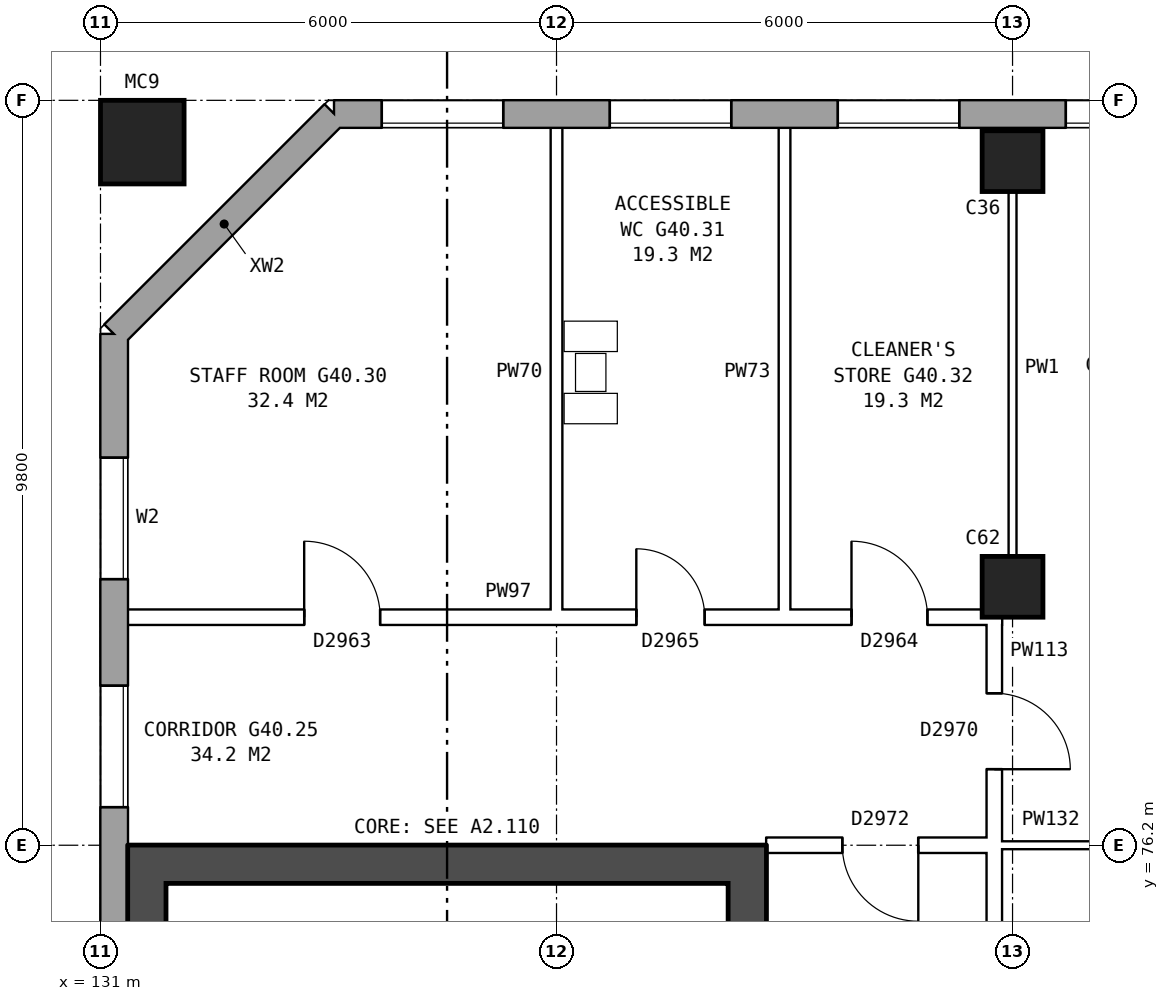
"""IFC4 building model, lengths in metres.
Left out: names, types, materials, properties, quantities, classifications, styles, units other than length and angle.
Written with IfcOpenShell. Run it as: python <this file> out.ifc"""

import sys

from ifc_helpers import new_model, si_unit, direction, frame, frame_2d, origin, origin_2d, place, context, subcontext, project, spatial, rectangle, hollow_rectangle, extrude, element, fill, save


model = new_model("IFC4")
c1 = context("Model", 3, precision=1e-05, world=origin(), true_north=direction((0.0, 1.0)))
c2 = subcontext(c1, "Body", "Model", "MODEL_VIEW")
j1 = project(units=[si_unit("LENGTHUNIT", "METRE"), si_unit("PLANEANGLEUNIT", "RADIAN")], contexts=[c1])
p1 = place(None, origin())
s1 = spatial("IfcSite", under=j1, at=p1, CompositionType="ELEMENT")
p2 = place(p1, origin())
s2 = spatial("IfcBuilding", under=s1, at=p2, CompositionType="ELEMENT")
p3 = place(p2, frame((0.0, 0.0, 142.3)))
s3 = spatial("IfcBuildingStorey", under=s2, at=p3, CompositionType="ELEMENT", Elevation=142.3)
for number, where, z_axis, x_axis in (
    (1, (143.0, 79.6, 0.0), (0.0, 0.0, 1.0), (1.0, 0.0, 0.0)),
    (2, (143.0, 85.2, 0.0), (0.0, 0.0, 1.0), (1.0, 0.0, 0.0)),
):
    element("IfcColumn", number, at=place(p3, frame(where, z_axis=z_axis, x_axis=x_axis)), inside=s3, PredefinedType="COLUMN", context=c2, shape_type="SweptSolid", body=[
        extrude(rectangle(XDim=0.8, YDim=0.8, at=origin_2d()), origin(), (0.0, 0.0, 1.0), 5.6),
    ])
p4 = place(p3, frame((131.55, 85.45, 0.0), z_axis=(0.0, 0.0, 1.0), x_axis=(1.0, 0.0, 0.0)))
e3 = element("IfcColumn", 3, at=p4, inside=s3, PredefinedType="COLUMN", context=c2, shape_type="SweptSolid", body=[
    extrude(hollow_rectangle(XDim=1.1, YDim=1.1, WallThickness=0.06, at=origin_2d()), origin(), (0.0, 0.0, 1.0), 6.2),
])
p5 = place(p3, frame((168.425, 85.82, 0.0), z_axis=(0.0, 0.0, 1.0), x_axis=(-1.0, 0.0, 0.0)))
e4 = element("IfcWall", 4, at=p5, inside=s3, PredefinedType="STANDARD", context=c2, shape_type="SweptSolid", body=[
    extrude(rectangle(XDim=34.351, YDim=0.36, at=frame_2d((17.175, 0.0))), origin(), (0.0, 0.0, 1.0), 5.6),
])
p6 = place(p5, frame((2.125, 0.0, 0.15)))
e5 = element("IfcOpeningElement", 5, at=p6, cuts=e4, PredefinedType="OPENING", context=c2, shape_type="SweptSolid", body=[
    extrude(rectangle(XDim=1.6, YDim=2.4, at=frame_2d((0.8, 1.2))), frame((0.0, 0.19, 0.0), z_axis=(0.0, -1.0, 0.0), x_axis=(1.0, 0.0, 0.0)), (0.0, 0.0, 1.0), 0.38),
])
p7 = place(p5, frame((5.125, 0.0, 0.15)))
e6 = element("IfcOpeningElement", 6, at=p7, cuts=e4, PredefinedType="OPENING", context=c2, shape_type="SweptSolid", body=[
    extrude(rectangle(XDim=1.6, YDim=2.4, at=frame_2d((0.8, 1.2))), frame((0.0, 0.19, 0.0), z_axis=(0.0, -1.0, 0.0), x_axis=(1.0, 0.0, 0.0)), (0.0, 0.0, 1.0), 0.38),
])
p8 = place(p5, frame((8.125, 0.0, 0.15)))
e7 = element("IfcOpeningElement", 7, at=p8, cuts=e4, PredefinedType="OPENING", context=c2, shape_type="SweptSolid", body=[
    extrude(rectangle(XDim=1.6, YDim=2.4, at=frame_2d((0.8, 1.2))), frame((0.0, 0.19, 0.0), z_axis=(0.0, -1.0, 0.0), x_axis=(1.0, 0.0, 0.0)), (0.0, 0.0, 1.0), 0.38),
])
p9 = place(p5, frame((11.125, 0.0, 0.15)))
e8 = element("IfcOpeningElement", 8, at=p9, cuts=e4, PredefinedType="OPENING", context=c2, shape_type="SweptSolid", body=[
    extrude(rectangle(XDim=1.6, YDim=2.4, at=frame_2d((0.8, 1.2))), frame((0.0, 0.19, 0.0), z_axis=(0.0, -1.0, 0.0), x_axis=(1.0, 0.0, 0.0)), (0.0, 0.0, 1.0), 0.38),
])
p10 = place(p5, frame((14.125, 0.0, 0.15)))
e9 = element("IfcOpeningElement", 9, at=p10, cuts=e4, PredefinedType="OPENING", context=c2, shape_type="SweptSolid", body=[
    extrude(rectangle(XDim=1.6, YDim=2.4, at=frame_2d((0.8, 1.2))), frame((0.0, 0.19, 0.0), z_axis=(0.0, -1.0, 0.0), x_axis=(1.0, 0.0, 0.0)), (0.0, 0.0, 1.0), 0.38),
])
p11 = place(p5, frame((17.125, 0.0, 0.15)))
e10 = element("IfcOpeningElement", 10, at=p11, cuts=e4, PredefinedType="OPENING", context=c2, shape_type="SweptSolid", body=[
    extrude(rectangle(XDim=1.6, YDim=2.4, at=frame_2d((0.8, 1.2))), frame((0.0, 0.19, 0.0), z_axis=(0.0, -1.0, 0.0), x_axis=(1.0, 0.0, 0.0)), (0.0, 0.0, 1.0), 0.38),
])
p12 = place(p5, frame((20.125, 0.0, 0.15)))
e11 = element("IfcOpeningElement", 11, at=p12, cuts=e4, PredefinedType="OPENING", context=c2, shape_type="SweptSolid", body=[
    extrude(rectangle(XDim=1.6, YDim=2.4, at=frame_2d((0.8, 1.2))), frame((0.0, 0.19, 0.0), z_axis=(0.0, -1.0, 0.0), x_axis=(1.0, 0.0, 0.0)), (0.0, 0.0, 1.0), 0.38),
])
p13 = place(p5, frame((23.125, 0.0, 0.15)))
e12 = element("IfcOpeningElement", 12, at=p13, cuts=e4, PredefinedType="OPENING", context=c2, shape_type="SweptSolid", body=[
    extrude(rectangle(XDim=1.6, YDim=2.4, at=frame_2d((0.8, 1.2))), frame((0.0, 0.19, 0.0), z_axis=(0.0, -1.0, 0.0), x_axis=(1.0, 0.0, 0.0)), (0.0, 0.0, 1.0), 0.38),
])
p14 = place(p5, frame((26.125, 0.0, 0.15)))
e13 = element("IfcOpeningElement", 13, at=p14, cuts=e4, PredefinedType="OPENING", context=c2, shape_type="SweptSolid", body=[
    extrude(rectangle(XDim=1.6, YDim=2.4, at=frame_2d((0.8, 1.2))), frame((0.0, 0.19, 0.0), z_axis=(0.0, -1.0, 0.0), x_axis=(1.0, 0.0, 0.0)), (0.0, 0.0, 1.0), 0.38),
])
p15 = place(p5, frame((29.125, 0.0, 0.15)))
e14 = element("IfcOpeningElement", 14, at=p15, cuts=e4, PredefinedType="OPENING", context=c2, shape_type="SweptSolid", body=[
    extrude(rectangle(XDim=1.6, YDim=2.4, at=frame_2d((0.8, 1.2))), frame((0.0, 0.19, 0.0), z_axis=(0.0, -1.0, 0.0), x_axis=(1.0, 0.0, 0.0)), (0.0, 0.0, 1.0), 0.38),
])
p16 = place(p5, frame((32.125, 0.0, 0.15)))
e15 = element("IfcOpeningElement", 15, at=p16, cuts=e4, PredefinedType="OPENING", context=c2, shape_type="SweptSolid", body=[
    extrude(rectangle(XDim=1.6, YDim=2.4, at=frame_2d((0.8, 1.2))), frame((0.0, 0.19, 0.0), z_axis=(0.0, -1.0, 0.0), x_axis=(1.0, 0.0, 0.0)), (0.0, 0.0, 1.0), 0.38),
])
p17 = place(p3, frame((134.075, 85.82, 0.0), z_axis=(0.0, 0.0, 1.0), x_axis=(-0.707106781187, -0.707106781187, 0.0)))
e16 = element("IfcWall", 16, at=p17, inside=s3, PredefinedType="STANDARD", context=c2, shape_type="SweptSolid", body=[
    extrude(rectangle(XDim=4.094, YDim=0.36, at=frame_2d((2.047, 0.0))), origin(), (0.0, 0.0, 1.0), 5.6),
])
p18 = place(p3, frame((131.18, 82.925, 0.0), z_axis=(0.0, 0.0, 1.0), x_axis=(0.0, -1.0, 0.0)))
e17 = element("IfcWall", 17, at=p18, inside=s3, PredefinedType="STANDARD", context=c2, shape_type="SweptSolid", body=[
    extrude(rectangle(XDim=25.851, YDim=0.36, at=frame_2d((12.925, 0.0))), origin(), (0.0, 0.0, 1.0), 5.6),
])
p19 = place(p18, frame((1.625, 0.0, 0.15)))
e18 = element("IfcOpeningElement", 18, at=p19, cuts=e17, PredefinedType="OPENING", context=c2, shape_type="SweptSolid", body=[
    extrude(rectangle(XDim=1.6, YDim=2.4, at=frame_2d((0.8, 1.2))), frame((0.0, 0.19, 0.0), z_axis=(0.0, -1.0, 0.0), x_axis=(1.0, 0.0, 0.0)), (0.0, 0.0, 1.0), 0.38),
])
p20 = place(p18, frame((4.625, 0.0, 0.15)))
e19 = element("IfcOpeningElement", 19, at=p20, cuts=e17, PredefinedType="OPENING", context=c2, shape_type="SweptSolid", body=[
    extrude(rectangle(XDim=1.6, YDim=2.4, at=frame_2d((0.8, 1.2))), frame((0.0, 0.19, 0.0), z_axis=(0.0, -1.0, 0.0), x_axis=(1.0, 0.0, 0.0)), (0.0, 0.0, 1.0), 0.38),
])
p21 = place(p18, frame((19.625, 0.0, 0.15)))
e20 = element("IfcOpeningElement", 20, at=p21, cuts=e17, PredefinedType="OPENING", context=c2, shape_type="SweptSolid", body=[
    extrude(rectangle(XDim=1.6, YDim=2.4, at=frame_2d((0.8, 1.2))), frame((0.0, 0.19, 0.0), z_axis=(0.0, -1.0, 0.0), x_axis=(1.0, 0.0, 0.0)), (0.0, 0.0, 1.0), 0.38),
])
p22 = place(p18, frame((22.625, 0.0, 0.15)))
e21 = element("IfcOpeningElement", 21, at=p22, cuts=e17, PredefinedType="OPENING", context=c2, shape_type="SweptSolid", body=[
    extrude(rectangle(XDim=1.6, YDim=2.4, at=frame_2d((0.8, 1.2))), frame((0.0, 0.19, 0.0), z_axis=(0.0, -1.0, 0.0), x_axis=(1.0, 0.0, 0.0)), (0.0, 0.0, 1.0), 0.38),
])
p23 = place(p3, frame((139.51, 63.8, 0.0), z_axis=(0.0, 0.0, 1.0), x_axis=(0.0, 1.0, 0.0)))
e22 = element("IfcWall", 22, at=p23, inside=s3, PredefinedType="SHEAR", context=c2, shape_type="SweptSolid", body=[
    extrude(rectangle(XDim=12.4, YDim=0.5, at=frame_2d((6.2, 0.0))), origin(), (0.0, 0.0, 1.0), 5.6),
])
p24 = place(p23, frame((1.325, 0.0, 0.0)))
e23 = element("IfcOpeningElement", 23, at=p24, cuts=e22, PredefinedType="OPENING", context=c2, shape_type="SweptSolid", body=[
    extrude(rectangle(XDim=1.1, YDim=2.1, at=frame_2d((0.55, 1.05))), frame((0.0, 0.26, 0.0), z_axis=(0.0, -1.0, 0.0), x_axis=(1.0, 0.0, 0.0)), (0.0, 0.0, 1.0), 0.52),
])
p25 = place(p23, frame((3.6, 0.0, 0.0)))
e24 = element("IfcOpeningElement", 24, at=p25, cuts=e22, PredefinedType="OPENING", context=c2, shape_type="SweptSolid", body=[
    extrude(rectangle(XDim=1.1, YDim=2.1, at=frame_2d((0.55, 1.05))), frame((0.0, 0.26, 0.0), z_axis=(0.0, -1.0, 0.0), x_axis=(1.0, 0.0, 0.0)), (0.0, 0.0, 1.0), 0.52),
])
p26 = place(p23, frame((5.8, 0.0, 0.0)))
e25 = element("IfcOpeningElement", 25, at=p26, cuts=e22, PredefinedType="OPENING", context=c2, shape_type="SweptSolid", body=[
    extrude(rectangle(XDim=1.1, YDim=2.1, at=frame_2d((0.55, 1.05))), frame((0.0, 0.26, 0.0), z_axis=(0.0, -1.0, 0.0), x_axis=(1.0, 0.0, 0.0)), (0.0, 0.0, 1.0), 0.52),
])
p27 = place(p23, frame((9.9, 0.0, 0.0)))
e26 = element("IfcOpeningElement", 26, at=p27, cuts=e22, PredefinedType="OPENING", context=c2, shape_type="SweptSolid", body=[
    extrude(rectangle(XDim=1.1, YDim=2.1, at=frame_2d((0.55, 1.05))), frame((0.0, 0.26, 0.0), z_axis=(0.0, -1.0, 0.0), x_axis=(1.0, 0.0, 0.0)), (0.0, 0.0, 1.0), 0.52),
])
p28 = place(p23, frame((8.125, 0.0, 0.0)))
e27 = element("IfcOpeningElement", 27, at=p28, cuts=e22, PredefinedType="OPENING", context=c2, shape_type="SweptSolid", body=[
    extrude(rectangle(XDim=0.85, YDim=2.1, at=frame_2d((0.425, 1.05))), frame((0.0, 0.26, 0.0), z_axis=(0.0, -1.0, 0.0), x_axis=(1.0, 0.0, 0.0)), (0.0, 0.0, 1.0), 0.52),
])
p29 = place(p3, frame((131.61, 63.8, 0.0), z_axis=(0.0, 0.0, 1.0), x_axis=(0.0, 1.0, 0.0)))
e28 = element("IfcWall", 28, at=p29, inside=s3, PredefinedType="SHEAR", context=c2, shape_type="SweptSolid", body=[
    extrude(rectangle(XDim=12.4, YDim=0.5, at=frame_2d((6.2, 0.0))), origin(), (0.0, 0.0, 1.0), 5.6),
])
p30 = place(p3, frame((139.26, 75.95, 0.0), z_axis=(0.0, 0.0, 1.0), x_axis=(-1.0, 0.0, 0.0)))
e29 = element("IfcWall", 29, at=p30, inside=s3, PredefinedType="SHEAR", context=c2, shape_type="SweptSolid", body=[
    extrude(rectangle(XDim=7.4, YDim=0.5, at=frame_2d((3.7, 0.0))), origin(), (0.0, 0.0, 1.0), 5.6),
])
p31 = place(p3, frame((142.76, 63.9, 0.0), z_axis=(0.0, 0.0, 1.0), x_axis=(0.0, 1.0, 0.0)))
e30 = element("IfcWall", 30, at=p31, inside=s3, PredefinedType="PARTITIONING", context=c2, shape_type="SweptSolid", body=[
    extrude(rectangle(XDim=12.2, YDim=0.2, at=frame_2d((6.1, 0.0))), origin(), (0.0, 0.0, 1.0), 5.6),
])
p32 = place(p31, frame((5.1, 0.0, 0.0)))
e31 = element("IfcOpeningElement", 31, at=p32, cuts=e30, PredefinedType="OPENING", context=c2, shape_type="SweptSolid", body=[
    extrude(rectangle(XDim=2.0, YDim=2.1, at=frame_2d((1.0, 1.05))), frame((0.0, 0.11, 0.0), z_axis=(0.0, -1.0, 0.0), x_axis=(1.0, 0.0, 0.0)), (0.0, 0.0, 1.0), 0.22),
])
p33 = place(p3, frame((139.76, 76.2, 0.0), z_axis=(0.0, 0.0, 1.0), x_axis=(1.0, 0.0, 0.0)))
e32 = element("IfcWall", 32, at=p33, inside=s3, PredefinedType="PARTITIONING", context=c2, shape_type="SweptSolid", body=[
    extrude(rectangle(XDim=3.1, YDim=0.2, at=frame_2d((1.55, 0.0))), origin(), (0.0, 0.0, 1.0), 5.6),
])
p34 = place(p33, frame((1.0, 0.0, 0.0)))
e33 = element("IfcOpeningElement", 33, at=p34, cuts=e32, PredefinedType="OPENING", context=c2, shape_type="SweptSolid", body=[
    extrude(rectangle(XDim=1.0, YDim=2.1, at=frame_2d((0.5, 1.05))), frame((0.0, 0.11, 0.0), z_axis=(0.0, -1.0, 0.0), x_axis=(1.0, 0.0, 0.0)), (0.0, 0.0, 1.0), 0.22),
])
p35 = place(p3, frame((142.66, 76.2, 0.0), z_axis=(0.0, 0.0, 1.0), x_axis=(1.0, 0.0, 0.0)))
e34 = element("IfcWall", 34, at=p35, inside=s3, PredefinedType="PARTITIONING", context=c2, shape_type="SweptSolid", body=[
    extrude(rectangle(XDim=14.68, YDim=0.1, at=frame_2d((7.34, 0.0))), origin(), (0.0, 0.0, 1.0), 5.6),
])
p36 = place(p35, frame((3.22, 0.0, 0.0)))
e35 = element("IfcOpeningElement", 35, at=p36, cuts=e34, PredefinedType="OPENING", context=c2, shape_type="SweptSolid", body=[
    extrude(rectangle(XDim=1.0, YDim=2.1, at=frame_2d((0.5, 1.05))), frame((0.0, 0.06, 0.0), z_axis=(0.0, -1.0, 0.0), x_axis=(1.0, 0.0, 0.0)), (0.0, 0.0, 1.0), 0.12),
])
p37 = place(p35, frame((10.46, 0.0, 0.0)))
e36 = element("IfcOpeningElement", 36, at=p37, cuts=e34, PredefinedType="OPENING", context=c2, shape_type="SweptSolid", body=[
    extrude(rectangle(XDim=1.0, YDim=2.1, at=frame_2d((0.5, 1.05))), frame((0.0, 0.06, 0.0), z_axis=(0.0, -1.0, 0.0), x_axis=(1.0, 0.0, 0.0)), (0.0, 0.0, 1.0), 0.12),
])
p38 = place(p3, frame((131.24, 79.2, 0.0), z_axis=(0.0, 0.0, 1.0), x_axis=(1.0, 0.0, 0.0)))
e37 = element("IfcWall", 37, at=p38, inside=s3, PredefinedType="PARTITIONING", context=c2, shape_type="SweptSolid", body=[
    extrude(rectangle(XDim=11.622, YDim=0.2, at=frame_2d((5.811, 0.0))), origin(), (0.0, 0.0, 1.0), 5.6),
])
p39 = place(p38, frame((2.44, 0.0, 0.0)))
e38 = element("IfcOpeningElement", 38, at=p39, cuts=e37, PredefinedType="OPENING", context=c2, shape_type="SweptSolid", body=[
    extrude(rectangle(XDim=1.0, YDim=2.1, at=frame_2d((0.5, 1.05))), frame((0.0, 0.11, 0.0), z_axis=(0.0, -1.0, 0.0), x_axis=(1.0, 0.0, 0.0)), (0.0, 0.0, 1.0), 0.22),
])
p40 = place(p38, frame((6.81, 0.0, 0.0)))
e39 = element("IfcOpeningElement", 39, at=p40, cuts=e37, PredefinedType="OPENING", context=c2, shape_type="SweptSolid", body=[
    extrude(rectangle(XDim=0.9, YDim=2.1, at=frame_2d((0.45, 1.05))), frame((0.0, 0.11, 0.0), z_axis=(0.0, -1.0, 0.0), x_axis=(1.0, 0.0, 0.0)), (0.0, 0.0, 1.0), 0.22),
])
p41 = place(p38, frame((9.641, 0.0, 0.0)))
e40 = element("IfcOpeningElement", 40, at=p41, cuts=e37, PredefinedType="OPENING", context=c2, shape_type="SweptSolid", body=[
    extrude(rectangle(XDim=1.0, YDim=2.1, at=frame_2d((0.5, 1.05))), frame((0.0, 0.11, 0.0), z_axis=(0.0, -1.0, 0.0), x_axis=(1.0, 0.0, 0.0)), (0.0, 0.0, 1.0), 0.22),
])
for number, where, z_axis, x_axis in (
    (41, (137.0, 79.1, 0.0), (0.0, 0.0, 1.0), (0.0, 1.0, 0.0)),
    (42, (140.0, 79.1, 0.0), (0.0, 0.0, 1.0), (0.0, 1.0, 0.0)),
):
    element("IfcWall", number, at=place(p3, frame(where, z_axis=z_axis, x_axis=x_axis)), inside=s3, PredefinedType="PLUMBINGWALL", context=c2, shape_type="SweptSolid", body=[
        extrude(rectangle(XDim=6.66, YDim=0.15, at=frame_2d((3.33, 0.0))), origin(), (0.0, 0.0, 1.0), 5.6),
    ])
p42 = place(p3, frame((142.76, 76.1, 0.0), z_axis=(0.0, 0.0, 1.0), x_axis=(0.0, 1.0, 0.0)))
e43 = element("IfcWall", 43, at=p42, inside=s3, PredefinedType="PARTITIONING", context=c2, shape_type="SweptSolid", body=[
    extrude(rectangle(XDim=3.2, YDim=0.2, at=frame_2d((1.6, 0.0))), origin(), (0.0, 0.0, 1.0), 5.6),
])
p43 = place(p42, frame((1.1, 0.0, 0.0)))
e44 = element("IfcOpeningElement", 44, at=p43, cuts=e43, PredefinedType="OPENING", context=c2, shape_type="SweptSolid", body=[
    extrude(rectangle(XDim=1.0, YDim=2.1, at=frame_2d((0.5, 1.05))), frame((0.0, 0.11, 0.0), z_axis=(0.0, -1.0, 0.0), x_axis=(1.0, 0.0, 0.0)), (0.0, 0.0, 1.0), 0.22),
])
p44 = place(p3, frame((143.0, 79.2, 0.0), z_axis=(0.0, 0.0, 1.0), x_axis=(0.0, 1.0, 0.0)))
e45 = element("IfcWall", 45, at=p44, inside=s3, PredefinedType="PARTITIONING", context=c2, shape_type="SweptSolid", body=[
    extrude(rectangle(XDim=6.56, YDim=0.1, at=frame_2d((3.28, 0.0))), origin(), (0.0, 0.0, 1.0), 5.6),
])
p45 = place(p13, origin())
e46 = element("IfcWindow", 46, at=p45, inside=s3, PartitioningType="SINGLE_PANEL", PredefinedType="WINDOW", context=c2, shape_type="SweptSolid", body=[
    extrude(rectangle(XDim=1.6, YDim=2.4, at=frame_2d((0.8, 1.2))), frame((0.0, 0.15, 0.0), z_axis=(0.0, -1.0, 0.0), x_axis=(1.0, 0.0, 0.0)), (0.0, 0.0, 1.0), 0.06),
])
fill(e12, e46)
p46 = place(p14, origin())
e47 = element("IfcWindow", 47, at=p46, inside=s3, PartitioningType="SINGLE_PANEL", PredefinedType="WINDOW", context=c2, shape_type="SweptSolid", body=[
    extrude(rectangle(XDim=1.6, YDim=2.4, at=frame_2d((0.8, 1.2))), frame((0.0, 0.15, 0.0), z_axis=(0.0, -1.0, 0.0), x_axis=(1.0, 0.0, 0.0)), (0.0, 0.0, 1.0), 0.06),
])
fill(e13, e47)
p47 = place(p15, origin())
e48 = element("IfcWindow", 48, at=p47, inside=s3, PartitioningType="SINGLE_PANEL", PredefinedType="WINDOW", context=c2, shape_type="SweptSolid", body=[
    extrude(rectangle(XDim=1.6, YDim=2.4, at=frame_2d((0.8, 1.2))), frame((0.0, 0.15, 0.0), z_axis=(0.0, -1.0, 0.0), x_axis=(1.0, 0.0, 0.0)), (0.0, 0.0, 1.0), 0.06),
])
fill(e14, e48)
p48 = place(p16, origin())
e49 = element("IfcWindow", 49, at=p48, inside=s3, PartitioningType="SINGLE_PANEL", PredefinedType="WINDOW", context=c2, shape_type="SweptSolid", body=[
    extrude(rectangle(XDim=1.6, YDim=2.4, at=frame_2d((0.8, 1.2))), frame((0.0, 0.15, 0.0), z_axis=(0.0, -1.0, 0.0), x_axis=(1.0, 0.0, 0.0)), (0.0, 0.0, 1.0), 0.06),
])
fill(e15, e49)
p49 = place(p19, origin())
e50 = element("IfcWindow", 50, at=p49, inside=s3, PartitioningType="SINGLE_PANEL", PredefinedType="WINDOW", context=c2, shape_type="SweptSolid", body=[
    extrude(rectangle(XDim=1.6, YDim=2.4, at=frame_2d((0.8, 1.2))), frame((0.0, 0.15, 0.0), z_axis=(0.0, -1.0, 0.0), x_axis=(1.0, 0.0, 0.0)), (0.0, 0.0, 1.0), 0.06),
])
fill(e18, e50)
p50 = place(p20, origin())
e51 = element("IfcWindow", 51, at=p50, inside=s3, PartitioningType="SINGLE_PANEL", PredefinedType="WINDOW", context=c2, shape_type="SweptSolid", body=[
    extrude(rectangle(XDim=1.6, YDim=2.4, at=frame_2d((0.8, 1.2))), frame((0.0, 0.15, 0.0), z_axis=(0.0, -1.0, 0.0), x_axis=(1.0, 0.0, 0.0)), (0.0, 0.0, 1.0), 0.06),
])
fill(e19, e51)
p51 = place(p34, frame((1.0, 0.0, 0.0), z_axis=(0.0, 0.0, 1.0), x_axis=(-1.0, 0.0, 0.0)))
e52 = element("IfcDoor", 52, at=p51, inside=s3, OperationType="SINGLE_SWING_LEFT", PredefinedType="DOOR", context=c2, shape_type="SweptSolid", body=[
    extrude(rectangle(XDim=1.0, YDim=2.1, at=frame_2d((0.5, 1.05))), frame((0.0, 0.025, 0.0), z_axis=(0.0, -1.0, 0.0), x_axis=(1.0, 0.0, 0.0)), (0.0, 0.0, 1.0), 0.05),
])
fill(e33, e52)
p52 = place(p39, origin())
e53 = element("IfcDoor", 53, at=p52, inside=s3, OperationType="SINGLE_SWING_LEFT", PredefinedType="DOOR", context=c2, shape_type="SweptSolid", body=[
    extrude(rectangle(XDim=1.0, YDim=2.1, at=frame_2d((0.5, 1.05))), frame((0.0, 0.025, 0.0), z_axis=(0.0, -1.0, 0.0), x_axis=(1.0, 0.0, 0.0)), (0.0, 0.0, 1.0), 0.05),
])
fill(e38, e53)
p53 = place(p40, origin())
e54 = element("IfcDoor", 54, at=p53, inside=s3, OperationType="SINGLE_SWING_LEFT", PredefinedType="DOOR", context=c2, shape_type="SweptSolid", body=[
    extrude(rectangle(XDim=0.9, YDim=2.1, at=frame_2d((0.45, 1.05))), frame((0.0, 0.025, 0.0), z_axis=(0.0, -1.0, 0.0), x_axis=(1.0, 0.0, 0.0)), (0.0, 0.0, 1.0), 0.05),
])
fill(e39, e54)
p54 = place(p41, origin())
e55 = element("IfcDoor", 55, at=p54, inside=s3, OperationType="SINGLE_SWING_LEFT", PredefinedType="DOOR", context=c2, shape_type="SweptSolid", body=[
    extrude(rectangle(XDim=1.0, YDim=2.1, at=frame_2d((0.5, 1.05))), frame((0.0, 0.025, 0.0), z_axis=(0.0, -1.0, 0.0), x_axis=(1.0, 0.0, 0.0)), (0.0, 0.0, 1.0), 0.05),
])
fill(e40, e55)
p55 = place(p43, frame((1.0, 0.0, 0.0), z_axis=(0.0, 0.0, 1.0), x_axis=(-1.0, 0.0, 0.0)))
e56 = element("IfcDoor", 56, at=p55, inside=s3, OperationType="SINGLE_SWING_RIGHT", PredefinedType="DOOR", context=c2, shape_type="SweptSolid", body=[
    extrude(rectangle(XDim=1.0, YDim=2.1, at=frame_2d((0.5, 1.05))), frame((0.0, 0.025, 0.0), z_axis=(0.0, -1.0, 0.0), x_axis=(1.0, 0.0, 0.0)), (0.0, 0.0, 1.0), 0.05),
])
fill(e44, e56)
save(model, sys.argv[1])
